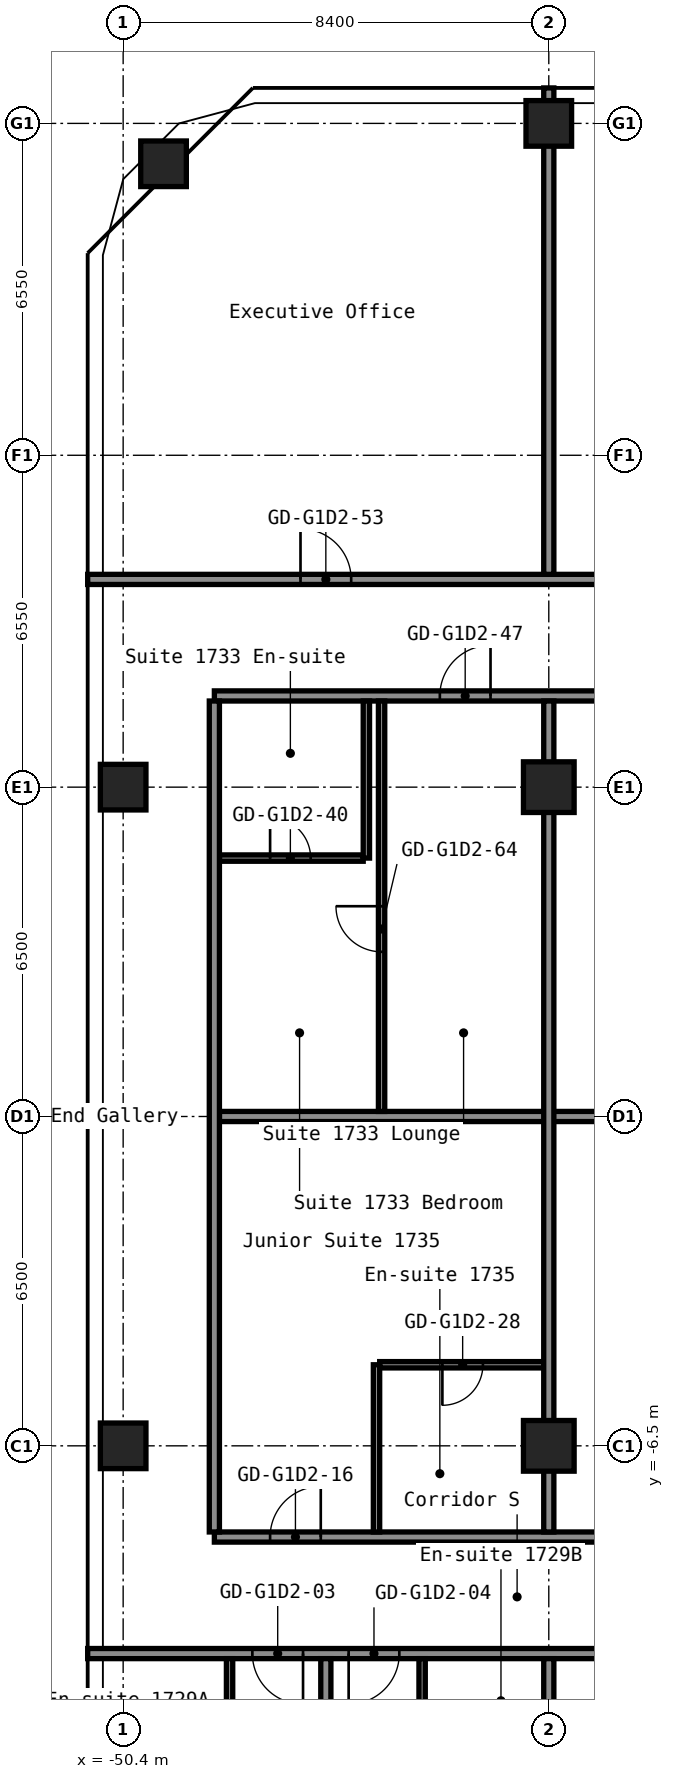
"""IFC4 building model, lengths in metres.
Left out: names, types, materials, properties, quantities, classifications, styles, units other than length and angle.
Written with IfcOpenShell. Run it as: python <this file> out.ifc"""

import sys

from ifc_helpers import new_model, si_unit, direction, frame, frame_2d, origin, origin_2d, place, context, subcontext, project, spatial, rectangle, hollow_rectangle, extrude, element, fill, save


model = new_model("IFC4")
c1 = context("Model", 3, precision=1e-05, world=origin(), true_north=direction((0.0, 1.0)))
c2 = subcontext(c1, "Body", "Model", "MODEL_VIEW")
j1 = project(units=[si_unit("LENGTHUNIT", "METRE"), si_unit("PLANEANGLEUNIT", "RADIAN")], contexts=[c1])
p1 = place(None, origin())
s1 = spatial("IfcSite", under=j1, at=p1, CompositionType="ELEMENT")
p2 = place(p1, origin())
s2 = spatial("IfcBuilding", under=s1, at=p2, CompositionType="ELEMENT")
p3 = place(p2, frame((0.0, 0.0, 61.4)))
s3 = spatial("IfcBuildingStorey", under=s2, at=p3, CompositionType="ELEMENT", Elevation=61.4)
for number, where, z_axis, x_axis in (
    (1, (-50.4, -6.5, 0.0), (0.0, 0.0, 1.0), (1.0, 0.0, 0.0)),
    (2, (-50.4, 6.5, 0.0), (0.0, 0.0, 1.0), (1.0, 0.0, 0.0)),
    (3, (-49.603, 18.803, 0.0), (0.0, 0.0, 1.0), (1.0, 0.0, 0.0)),
):
    element("IfcColumn", number, at=place(p3, frame(where, z_axis=z_axis, x_axis=x_axis)), inside=s3, PredefinedType="COLUMN", context=c2, shape_type="SweptSolid", body=[
        extrude(hollow_rectangle(XDim=0.9, YDim=0.9, WallThickness=0.036, at=origin_2d()), origin(), (0.0, 0.0, 1.0), 2.9),
    ])
for number, where, z_axis, x_axis in (
    (4, (-42.0, -6.5, 0.0), (0.0, 0.0, 1.0), (1.0, 0.0, 0.0)),
    (5, (-42.0, 6.5, 0.0), (0.0, 0.0, 1.0), (1.0, 0.0, 0.0)),
):
    element("IfcColumn", number, at=place(p3, frame(where, z_axis=z_axis, x_axis=x_axis)), inside=s3, PredefinedType="COLUMN", context=c2, shape_type="SweptSolid", body=[
        extrude(hollow_rectangle(XDim=1.0, YDim=1.0, WallThickness=0.04, at=origin_2d()), origin(), (0.0, 0.0, 1.0), 2.9),
    ])
p4 = place(p3, frame((-42.0, 19.6, 0.0), z_axis=(0.0, 0.0, 1.0), x_axis=(1.0, 0.0, 0.0)))
e6 = element("IfcColumn", 6, at=p4, inside=s3, PredefinedType="COLUMN", context=c2, shape_type="SweptSolid", body=[
    extrude(hollow_rectangle(XDim=0.9, YDim=0.9, WallThickness=0.036, at=origin_2d()), origin(), (0.0, 0.0, 1.0), 2.9),
])
p5 = place(p3, frame((-51.1, -10.6, 0.0), z_axis=(0.0, 0.0, 1.0), x_axis=(1.0, 0.0, 0.0)))
e7 = element("IfcWall", 7, at=p5, inside=s3, PredefinedType="PARTITIONING", context=c2, shape_type="SweptSolid", body=[
    extrude(rectangle(XDim=34.3, YDim=0.2, at=frame_2d((17.15, 0.0))), origin(), (0.0, 0.0, 1.0), 2.9),
])
p6 = place(p5, frame((3.25, 0.0, 0.0)))
e8 = element("IfcOpeningElement", 8, at=p6, cuts=e7, PredefinedType="OPENING", context=c2, shape_type="SweptSolid", body=[
    extrude(rectangle(XDim=1.0, YDim=2.1, at=frame_2d((0.5, 1.05))), frame((0.0, 0.11, 0.0), z_axis=(0.0, -1.0, 0.0), x_axis=(1.0, 0.0, 0.0)), (0.0, 0.0, 1.0), 0.22),
])
p7 = place(p5, frame((5.15, 0.0, 0.0)))
e9 = element("IfcOpeningElement", 9, at=p7, cuts=e7, PredefinedType="OPENING", context=c2, shape_type="SweptSolid", body=[
    extrude(rectangle(XDim=1.0, YDim=2.1, at=frame_2d((0.5, 1.05))), frame((0.0, 0.11, 0.0), z_axis=(0.0, -1.0, 0.0), x_axis=(1.0, 0.0, 0.0)), (0.0, 0.0, 1.0), 0.22),
])
p8 = place(p5, frame((11.1, 0.0, 0.0)))
e10 = element("IfcOpeningElement", 10, at=p8, cuts=e7, PredefinedType="OPENING", context=c2, shape_type="SweptSolid", body=[
    extrude(rectangle(XDim=1.0, YDim=2.1, at=frame_2d((0.5, 1.05))), frame((0.0, 0.11, 0.0), z_axis=(0.0, -1.0, 0.0), x_axis=(1.0, 0.0, 0.0)), (0.0, 0.0, 1.0), 0.22),
])
p9 = place(p5, frame((20.35, 0.0, 0.0)))
e11 = element("IfcOpeningElement", 11, at=p9, cuts=e7, PredefinedType="OPENING", context=c2, shape_type="SweptSolid", body=[
    extrude(rectangle(XDim=1.0, YDim=2.1, at=frame_2d((0.5, 1.05))), frame((0.0, 0.11, 0.0), z_axis=(0.0, -1.0, 0.0), x_axis=(1.0, 0.0, 0.0)), (0.0, 0.0, 1.0), 0.22),
])
p10 = place(p5, frame((22.05, 0.0, 0.0)))
e12 = element("IfcOpeningElement", 12, at=p10, cuts=e7, PredefinedType="OPENING", context=c2, shape_type="SweptSolid", body=[
    extrude(rectangle(XDim=1.0, YDim=2.1, at=frame_2d((0.5, 1.05))), frame((0.0, 0.11, 0.0), z_axis=(0.0, -1.0, 0.0), x_axis=(1.0, 0.0, 0.0)), (0.0, 0.0, 1.0), 0.22),
])
p11 = place(p5, frame((31.3, 0.0, 0.0)))
e13 = element("IfcOpeningElement", 13, at=p11, cuts=e7, PredefinedType="OPENING", context=c2, shape_type="SweptSolid", body=[
    extrude(rectangle(XDim=1.0, YDim=2.1, at=frame_2d((0.5, 1.05))), frame((0.0, 0.11, 0.0), z_axis=(0.0, -1.0, 0.0), x_axis=(1.0, 0.0, 0.0)), (0.0, 0.0, 1.0), 0.22),
])
p12 = place(p3, frame((-48.6, -8.3, 0.0), z_axis=(0.0, 0.0, 1.0), x_axis=(1.0, 0.0, 0.0)))
e14 = element("IfcWall", 14, at=p12, inside=s3, PredefinedType="PARTITIONING", context=c2, shape_type="SweptSolid", body=[
    extrude(rectangle(XDim=15.0, YDim=0.2, at=frame_2d((7.5, 0.0))), origin(), (0.0, 0.0, 1.0), 2.9),
])
p13 = place(p12, frame((1.1, 0.0, 0.0)))
e15 = element("IfcOpeningElement", 15, at=p13, cuts=e14, PredefinedType="OPENING", context=c2, shape_type="SweptSolid", body=[
    extrude(rectangle(XDim=1.0, YDim=2.1, at=frame_2d((0.5, 1.05))), frame((0.0, 0.11, 0.0), z_axis=(0.0, -1.0, 0.0), x_axis=(1.0, 0.0, 0.0)), (0.0, 0.0, 1.0), 0.22),
])
p14 = place(p12, frame((8.2, 0.0, 0.0)))
e16 = element("IfcOpeningElement", 16, at=p14, cuts=e14, PredefinedType="OPENING", context=c2, shape_type="SweptSolid", body=[
    extrude(rectangle(XDim=1.0, YDim=2.1, at=frame_2d((0.5, 1.05))), frame((0.0, 0.11, 0.0), z_axis=(0.0, -1.0, 0.0), x_axis=(1.0, 0.0, 0.0)), (0.0, 0.0, 1.0), 0.22),
])
p15 = place(p3, frame((-45.337, -4.9, 0.0), z_axis=(0.0, 0.0, 1.0), x_axis=(1.0, 0.0, 0.0)))
e17 = element("IfcWall", 17, at=p15, inside=s3, PredefinedType="PARTITIONING", context=c2, shape_type="SweptSolid", body=[
    extrude(rectangle(XDim=3.237, YDim=0.125, at=frame_2d((1.619, 0.0))), origin(), (0.0, 0.0, 1.0), 2.9),
])
p16 = place(p15, frame((1.238, 0.0, 0.0)))
e18 = element("IfcOpeningElement", 18, at=p16, cuts=e17, PredefinedType="OPENING", context=c2, shape_type="SweptSolid", body=[
    extrude(rectangle(XDim=0.8, YDim=2.1, at=frame_2d((0.4, 1.05))), frame((0.0, 0.073, 0.0), z_axis=(0.0, -1.0, 0.0), x_axis=(1.0, 0.0, 0.0)), (0.0, 0.0, 1.0), 0.145),
])
p17 = place(p3, frame((-48.5, 0.0, 0.0), z_axis=(0.0, 0.0, 1.0), x_axis=(1.0, 0.0, 0.0)))
e19 = element("IfcWall", 19, at=p17, inside=s3, PredefinedType="PARTITIONING", context=c2, shape_type="SweptSolid", body=[
    extrude(rectangle(XDim=14.9, YDim=0.2, at=frame_2d((7.45, 0.0))), origin(), (0.0, 0.0, 1.0), 2.9),
])
p18 = place(p3, frame((-48.5, 5.1, 0.0), z_axis=(0.0, 0.0, 1.0), x_axis=(1.0, 0.0, 0.0)))
e20 = element("IfcWall", 20, at=p18, inside=s3, PredefinedType="PARTITIONING", context=c2, shape_type="SweptSolid", body=[
    extrude(rectangle(XDim=2.837, YDim=0.125, at=frame_2d((1.419, 0.0))), origin(), (0.0, 0.0, 1.0), 2.9),
])
p19 = place(p18, frame((1.0, 0.0, 0.0)))
e21 = element("IfcOpeningElement", 21, at=p19, cuts=e20, PredefinedType="OPENING", context=c2, shape_type="SweptSolid", body=[
    extrude(rectangle(XDim=0.8, YDim=2.1, at=frame_2d((0.4, 1.05))), frame((0.0, 0.073, 0.0), z_axis=(0.0, -1.0, 0.0), x_axis=(1.0, 0.0, 0.0)), (0.0, 0.0, 1.0), 0.145),
])
p20 = place(p3, frame((-48.6, 8.3, 0.0), z_axis=(0.0, 0.0, 1.0), x_axis=(1.0, 0.0, 0.0)))
e22 = element("IfcWall", 22, at=p20, inside=s3, PredefinedType="PARTITIONING", context=c2, shape_type="SweptSolid", body=[
    extrude(rectangle(XDim=15.0, YDim=0.2, at=frame_2d((7.5, 0.0))), origin(), (0.0, 0.0, 1.0), 2.9),
])
p21 = place(p20, frame((4.45, 0.0, 0.0)))
e23 = element("IfcOpeningElement", 23, at=p21, cuts=e22, PredefinedType="OPENING", context=c2, shape_type="SweptSolid", body=[
    extrude(rectangle(XDim=1.0, YDim=2.1, at=frame_2d((0.5, 1.05))), frame((0.0, 0.11, 0.0), z_axis=(0.0, -1.0, 0.0), x_axis=(1.0, 0.0, 0.0)), (0.0, 0.0, 1.0), 0.22),
])
p22 = place(p20, frame((8.6, 0.0, 0.0)))
e24 = element("IfcOpeningElement", 24, at=p22, cuts=e22, PredefinedType="OPENING", context=c2, shape_type="SweptSolid", body=[
    extrude(rectangle(XDim=1.0, YDim=2.1, at=frame_2d((0.5, 1.05))), frame((0.0, 0.11, 0.0), z_axis=(0.0, -1.0, 0.0), x_axis=(1.0, 0.0, 0.0)), (0.0, 0.0, 1.0), 0.22),
])
p23 = place(p3, frame((-51.1, 10.6, 0.0), z_axis=(0.0, 0.0, 1.0), x_axis=(1.0, 0.0, 0.0)))
e25 = element("IfcWall", 25, at=p23, inside=s3, PredefinedType="PARTITIONING", context=c2, shape_type="SweptSolid", body=[
    extrude(rectangle(XDim=34.3, YDim=0.2, at=frame_2d((17.15, 0.0))), origin(), (0.0, 0.0, 1.0), 2.9),
])
p24 = place(p23, frame((4.2, 0.0, 0.0)))
e26 = element("IfcOpeningElement", 26, at=p24, cuts=e25, PredefinedType="OPENING", context=c2, shape_type="SweptSolid", body=[
    extrude(rectangle(XDim=1.0, YDim=2.1, at=frame_2d((0.5, 1.05))), frame((0.0, 0.11, 0.0), z_axis=(0.0, -1.0, 0.0), x_axis=(1.0, 0.0, 0.0)), (0.0, 0.0, 1.0), 0.22),
])
p25 = place(p23, frame((10.16, 0.0, 0.0)))
e27 = element("IfcOpeningElement", 27, at=p25, cuts=e25, PredefinedType="OPENING", context=c2, shape_type="SweptSolid", body=[
    extrude(rectangle(XDim=0.9, YDim=2.1, at=frame_2d((0.45, 1.05))), frame((0.0, 0.11, 0.0), z_axis=(0.0, -1.0, 0.0), x_axis=(1.0, 0.0, 0.0)), (0.0, 0.0, 1.0), 0.22),
])
p26 = place(p23, frame((14.36, 0.0, 0.0)))
e28 = element("IfcOpeningElement", 28, at=p26, cuts=e25, PredefinedType="OPENING", context=c2, shape_type="SweptSolid", body=[
    extrude(rectangle(XDim=0.9, YDim=2.1, at=frame_2d((0.45, 1.05))), frame((0.0, 0.11, 0.0), z_axis=(0.0, -1.0, 0.0), x_axis=(1.0, 0.0, 0.0)), (0.0, 0.0, 1.0), 0.22),
])
p27 = place(p23, frame((21.2, 0.0, 0.0)))
e29 = element("IfcOpeningElement", 29, at=p27, cuts=e25, PredefinedType="OPENING", context=c2, shape_type="SweptSolid", body=[
    extrude(rectangle(XDim=1.0, YDim=2.1, at=frame_2d((0.5, 1.05))), frame((0.0, 0.11, 0.0), z_axis=(0.0, -1.0, 0.0), x_axis=(1.0, 0.0, 0.0)), (0.0, 0.0, 1.0), 0.22),
])
p28 = place(p23, frame((27.72, 0.0, 0.0)))
e30 = element("IfcOpeningElement", 30, at=p28, cuts=e25, PredefinedType="OPENING", context=c2, shape_type="SweptSolid", body=[
    extrude(rectangle(XDim=0.9, YDim=2.1, at=frame_2d((0.45, 1.05))), frame((0.0, 0.11, 0.0), z_axis=(0.0, -1.0, 0.0), x_axis=(1.0, 0.0, 0.0)), (0.0, 0.0, 1.0), 0.22),
])
p29 = place(p23, frame((31.92, 0.0, 0.0)))
e31 = element("IfcOpeningElement", 31, at=p29, cuts=e25, PredefinedType="OPENING", context=c2, shape_type="SweptSolid", body=[
    extrude(rectangle(XDim=0.9, YDim=2.1, at=frame_2d((0.45, 1.05))), frame((0.0, 0.11, 0.0), z_axis=(0.0, -1.0, 0.0), x_axis=(1.0, 0.0, 0.0)), (0.0, 0.0, 1.0), 0.22),
])
p30 = place(p3, frame((-48.6, -8.2, 0.0), z_axis=(0.0, 0.0, 1.0), x_axis=(0.0, 1.0, 0.0)))
e32 = element("IfcWall", 32, at=p30, inside=s3, PredefinedType="PARTITIONING", context=c2, shape_type="SweptSolid", body=[
    extrude(rectangle(XDim=16.4, YDim=0.2, at=frame_2d((8.2, 0.0))), origin(), (0.0, 0.0, 1.0), 2.9),
])
p31 = place(p3, frame((-48.3, -13.6, 0.0), z_axis=(0.0, 0.0, 1.0), x_axis=(0.0, 1.0, 0.0)))
e33 = element("IfcWall", 33, at=p31, inside=s3, PredefinedType="PARTITIONING", context=c2, shape_type="SweptSolid", body=[
    extrude(rectangle(XDim=2.9, YDim=0.125, at=frame_2d((1.45, 0.0))), origin(), (0.0, 0.0, 1.0), 2.9),
])
p32 = place(p31, frame((0.6, 0.0, 0.0)))
e34 = element("IfcOpeningElement", 34, at=p32, cuts=e33, PredefinedType="OPENING", context=c2, shape_type="SweptSolid", body=[
    extrude(rectangle(XDim=0.8, YDim=2.1, at=frame_2d((0.4, 1.05))), frame((0.0, 0.073, 0.0), z_axis=(0.0, -1.0, 0.0), x_axis=(1.0, 0.0, 0.0)), (0.0, 0.0, 1.0), 0.145),
])
p33 = place(p3, frame((-46.4, -20.3, 0.0), z_axis=(0.0, 0.0, 1.0), x_axis=(0.0, 1.0, 0.0)))
e35 = element("IfcWall", 35, at=p33, inside=s3, PredefinedType="PARTITIONING", context=c2, shape_type="SweptSolid", body=[
    extrude(rectangle(XDim=9.6, YDim=0.2, at=frame_2d((4.8, 0.0))), origin(), (0.0, 0.0, 1.0), 2.9),
])
p34 = place(p3, frame((-45.6, 5.1, 0.0), z_axis=(0.0, 0.0, 1.0), x_axis=(0.0, 1.0, 0.0)))
e36 = element("IfcWall", 36, at=p34, inside=s3, PredefinedType="PARTITIONING", context=c2, shape_type="SweptSolid", body=[
    extrude(rectangle(XDim=3.1, YDim=0.125, at=frame_2d((1.55, 0.0))), origin(), (0.0, 0.0, 1.0), 2.9),
])
p35 = place(p3, frame((-45.4, -8.2, 0.0), z_axis=(0.0, 0.0, 1.0), x_axis=(0.0, 1.0, 0.0)))
e37 = element("IfcWall", 37, at=p35, inside=s3, PredefinedType="PARTITIONING", context=c2, shape_type="SweptSolid", body=[
    extrude(rectangle(XDim=3.3, YDim=0.125, at=frame_2d((1.65, 0.0))), origin(), (0.0, 0.0, 1.0), 2.9),
])
p36 = place(p3, frame((-45.3, 0.1, 0.0), z_axis=(0.0, 0.0, 1.0), x_axis=(0.0, 1.0, 0.0)))
e38 = element("IfcWall", 38, at=p36, inside=s3, PredefinedType="PARTITIONING", context=c2, shape_type="SweptSolid", body=[
    extrude(rectangle(XDim=8.1, YDim=0.125, at=frame_2d((4.05, 0.0))), origin(), (0.0, 0.0, 1.0), 2.9),
])
p37 = place(p36, frame((3.15, 0.0, 0.0)))
e39 = element("IfcOpeningElement", 39, at=p37, cuts=e38, PredefinedType="OPENING", context=c2, shape_type="SweptSolid", body=[
    extrude(rectangle(XDim=0.9, YDim=2.1, at=frame_2d((0.45, 1.05))), frame((0.0, 0.073, 0.0), z_axis=(0.0, -1.0, 0.0), x_axis=(1.0, 0.0, 0.0)), (0.0, 0.0, 1.0), 0.145),
])
p38 = place(p3, frame((-44.5, -13.6, 0.0), z_axis=(0.0, 0.0, 1.0), x_axis=(0.0, 1.0, 0.0)))
e40 = element("IfcWall", 40, at=p38, inside=s3, PredefinedType="PARTITIONING", context=c2, shape_type="SweptSolid", body=[
    extrude(rectangle(XDim=2.9, YDim=0.125, at=frame_2d((1.45, 0.0))), origin(), (0.0, 0.0, 1.0), 2.9),
])
p39 = place(p38, frame((0.6, 0.0, 0.0)))
e41 = element("IfcOpeningElement", 41, at=p39, cuts=e40, PredefinedType="OPENING", context=c2, shape_type="SweptSolid", body=[
    extrude(rectangle(XDim=0.8, YDim=2.1, at=frame_2d((0.4, 1.05))), frame((0.0, 0.073, 0.0), z_axis=(0.0, -1.0, 0.0), x_axis=(1.0, 0.0, 0.0)), (0.0, 0.0, 1.0), 0.145),
])
p40 = place(p3, frame((-42.0, -20.3, 0.0), z_axis=(0.0, 0.0, 1.0), x_axis=(0.0, 1.0, 0.0)))
e42 = element("IfcWall", 42, at=p40, inside=s3, PredefinedType="PARTITIONING", context=c2, shape_type="SweptSolid", body=[
    extrude(rectangle(XDim=9.6, YDim=0.2, at=frame_2d((4.8, 0.0))), origin(), (0.0, 0.0, 1.0), 2.9),
])
p41 = place(p3, frame((-42.0, -8.2, 0.0), z_axis=(0.0, 0.0, 1.0), x_axis=(0.0, 1.0, 0.0)))
e43 = element("IfcWall", 43, at=p41, inside=s3, PredefinedType="PARTITIONING", context=c2, shape_type="SweptSolid", body=[
    extrude(rectangle(XDim=16.4, YDim=0.2, at=frame_2d((8.2, 0.0))), origin(), (0.0, 0.0, 1.0), 2.9),
])
p42 = place(p3, frame((-42.0, 10.7, 0.0), z_axis=(0.0, 0.0, 1.0), x_axis=(0.0, 1.0, 0.0)))
e44 = element("IfcWall", 44, at=p42, inside=s3, PredefinedType="PARTITIONING", context=c2, shape_type="SweptSolid", body=[
    extrude(rectangle(XDim=9.6, YDim=0.2, at=frame_2d((4.8, 0.0))), origin(), (0.0, 0.0, 1.0), 2.9),
])
p43 = place(p6, origin())
e45 = element("IfcDoor", 45, at=p43, inside=s3, OperationType="SINGLE_SWING_RIGHT", PredefinedType="DOOR", context=c2, shape_type="SweptSolid", body=[
    extrude(rectangle(XDim=1.0, YDim=2.1, at=frame_2d((0.5, 1.05))), frame((0.0, 0.025, 0.0), z_axis=(0.0, -1.0, 0.0), x_axis=(1.0, 0.0, 0.0)), (0.0, 0.0, 1.0), 0.05),
])
fill(e8, e45)
p44 = place(p7, origin())
e46 = element("IfcDoor", 46, at=p44, inside=s3, OperationType="SINGLE_SWING_LEFT", PredefinedType="DOOR", context=c2, shape_type="SweptSolid", body=[
    extrude(rectangle(XDim=1.0, YDim=2.1, at=frame_2d((0.5, 1.05))), frame((0.0, 0.025, 0.0), z_axis=(0.0, -1.0, 0.0), x_axis=(1.0, 0.0, 0.0)), (0.0, 0.0, 1.0), 0.05),
])
fill(e9, e46)
p45 = place(p13, origin())
e47 = element("IfcDoor", 47, at=p45, inside=s3, OperationType="SINGLE_SWING_LEFT", PredefinedType="DOOR", context=c2, shape_type="SweptSolid", body=[
    extrude(rectangle(XDim=1.0, YDim=2.1, at=frame_2d((0.5, 1.05))), frame((0.0, 0.025, 0.0), z_axis=(0.0, -1.0, 0.0), x_axis=(1.0, 0.0, 0.0)), (0.0, 0.0, 1.0), 0.05),
])
fill(e15, e47)
p46 = place(p16, origin())
e48 = element("IfcDoor", 48, at=p46, inside=s3, OperationType="SINGLE_SWING_LEFT", PredefinedType="DOOR", context=c2, shape_type="SweptSolid", body=[
    extrude(rectangle(XDim=0.8, YDim=2.1, at=frame_2d((0.4, 1.05))), frame((0.0, 0.025, 0.0), z_axis=(0.0, -1.0, 0.0), x_axis=(1.0, 0.0, 0.0)), (0.0, 0.0, 1.0), 0.05),
])
fill(e18, e48)
p47 = place(p19, origin())
e49 = element("IfcDoor", 49, at=p47, inside=s3, OperationType="SINGLE_SWING_RIGHT", PredefinedType="DOOR", context=c2, shape_type="SweptSolid", body=[
    extrude(rectangle(XDim=0.8, YDim=2.1, at=frame_2d((0.4, 1.05))), frame((0.0, 0.025, 0.0), z_axis=(0.0, -1.0, 0.0), x_axis=(1.0, 0.0, 0.0)), (0.0, 0.0, 1.0), 0.05),
])
fill(e21, e49)
p48 = place(p21, origin())
e50 = element("IfcDoor", 50, at=p48, inside=s3, OperationType="SINGLE_SWING_LEFT", PredefinedType="DOOR", context=c2, shape_type="SweptSolid", body=[
    extrude(rectangle(XDim=1.0, YDim=2.1, at=frame_2d((0.5, 1.05))), frame((0.0, 0.025, 0.0), z_axis=(0.0, -1.0, 0.0), x_axis=(1.0, 0.0, 0.0)), (0.0, 0.0, 1.0), 0.05),
])
fill(e23, e50)
p49 = place(p24, origin())
e51 = element("IfcDoor", 51, at=p49, inside=s3, OperationType="SINGLE_SWING_RIGHT", PredefinedType="DOOR", context=c2, shape_type="SweptSolid", body=[
    extrude(rectangle(XDim=1.0, YDim=2.1, at=frame_2d((0.5, 1.05))), frame((0.0, 0.025, 0.0), z_axis=(0.0, -1.0, 0.0), x_axis=(1.0, 0.0, 0.0)), (0.0, 0.0, 1.0), 0.05),
])
fill(e26, e51)
p50 = place(p37, origin())
e52 = element("IfcDoor", 52, at=p50, inside=s3, OperationType="SINGLE_SWING_LEFT", PredefinedType="DOOR", context=c2, shape_type="SweptSolid", body=[
    extrude(rectangle(XDim=0.9, YDim=2.1, at=frame_2d((0.45, 1.05))), frame((0.0, 0.025, 0.0), z_axis=(0.0, -1.0, 0.0), x_axis=(1.0, 0.0, 0.0)), (0.0, 0.0, 1.0), 0.05),
])
fill(e39, e52)
save(model, sys.argv[1])
